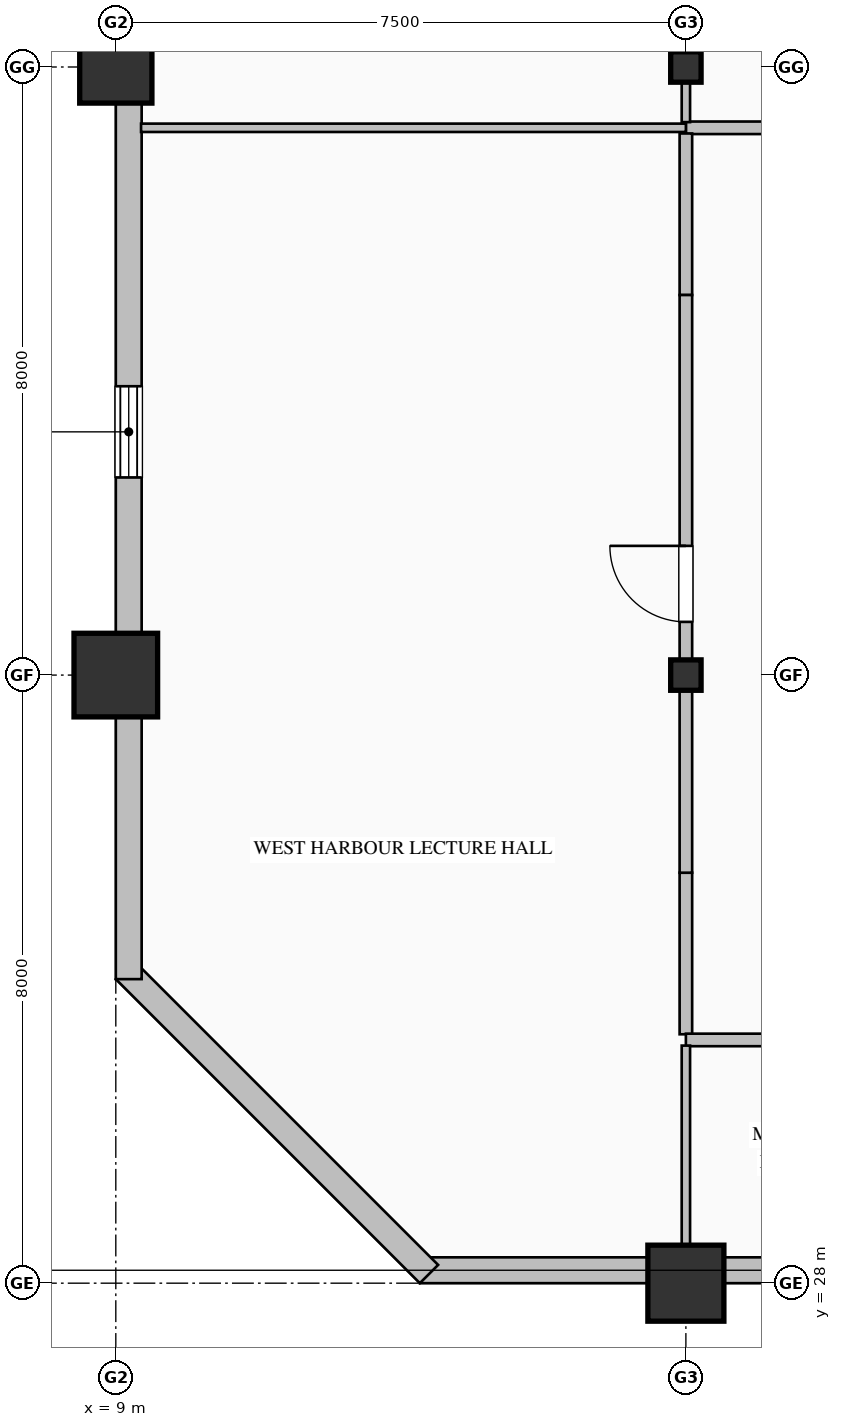
"""IFC4 building model, lengths in metres.
Left out: names, types, materials, properties, quantities, classifications, styles, units other than length and angle.
Written with IfcOpenShell. Run it as: python <this file> out.ifc"""

import sys

from ifc_helpers import new_model, si_unit, direction, frame, frame_2d, origin, origin_2d, place, context, subcontext, project, spatial, rectangle, hollow_rectangle, hollow_circle, i_section, extrude, element, fill, save


model = new_model("IFC4")
c1 = context("Model", 3, precision=1e-05, world=origin(), true_north=direction((0.0, 1.0)))
c2 = subcontext(c1, "Body", "Model", "MODEL_VIEW")
j1 = project(units=[si_unit("LENGTHUNIT", "METRE"), si_unit("PLANEANGLEUNIT", "RADIAN")], contexts=[c1])
p1 = place(None, origin())
s1 = spatial("IfcSite", under=j1, at=p1, CompositionType="ELEMENT")
p2 = place(p1, origin())
s2 = spatial("IfcBuilding", under=s1, at=p2, CompositionType="ELEMENT")
p3 = place(p2, frame((0.0, 0.0, 131.0)))
s3 = spatial("IfcBuildingStorey", under=s2, at=p3, CompositionType="ELEMENT", Elevation=131.0)
p4 = place(p3, frame((9.0, 36.0, 0.0), z_axis=(0.0, 0.0, 1.0), x_axis=(1.0, 0.0, 0.0)))
e1 = element("IfcColumn", 1, at=p4, inside=s3, PredefinedType="COLUMN", context=c2, shape_type="SweptSolid", body=[
    extrude(hollow_rectangle(XDim=1.1, YDim=1.1, WallThickness=0.04, at=origin_2d()), origin(), (0.0, 0.0, 1.0), 4.0),
])
p5 = place(p3, frame((9.0, 44.0, 0.0), z_axis=(0.0, 0.0, 1.0), x_axis=(1.0, 0.0, 0.0)))
e2 = element("IfcColumn", 2, at=p5, inside=s3, PredefinedType="COLUMN", context=c2, shape_type="SweptSolid", body=[
    extrude(hollow_rectangle(XDim=0.95, YDim=0.95, WallThickness=0.036, at=origin_2d()), origin(), (0.0, 0.0, 1.0), 4.0),
])
p6 = place(p3, frame((16.5, 28.0, 0.0), z_axis=(0.0, 0.0, 1.0), x_axis=(1.0, 0.0, 0.0)))
e3 = element("IfcColumn", 3, at=p6, inside=s3, PredefinedType="COLUMN", context=c2, shape_type="SweptSolid", body=[
    extrude(hollow_circle(Radius=0.5, WallThickness=0.036, at=origin_2d()), origin(), (0.0, 0.0, 1.0), 4.0),
])
for number, where, z_axis, x_axis in (
    (4, (16.5, 36.0, 0.0), (0.0, 0.0, 1.0), (1.0, 0.0, 0.0)),
    (5, (16.5, 44.0, 0.0), (0.0, 0.0, 1.0), (1.0, 0.0, 0.0)),
):
    element("IfcColumn", number, at=place(p3, frame(where, z_axis=z_axis, x_axis=x_axis)), inside=s3, PredefinedType="COLUMN", context=c2, shape_type="SweptSolid", body=[
        extrude(i_section(OverallWidth=0.4, OverallDepth=0.4, WebThickness=0.013, FlangeThickness=0.021, FilletRadius=0.022, at=origin_2d()), origin(), (0.0, 0.0, 1.0), 4.0),
    ])
p7 = place(p3, frame((40.52, 28.17, 0.0), z_axis=(0.0, 0.0, 1.0), x_axis=(-1.0, 0.0, 0.0)))
e6 = element("IfcWall", 6, at=p7, inside=s3, PredefinedType="SOLIDWALL", context=c2, shape_type="SweptSolid", body=[
    extrude(rectangle(XDim=27.52, YDim=0.34, at=frame_2d((13.76, 0.0))), origin(), (0.0, 0.0, 1.0), 3.165),
])
p8 = place(p7, frame((9.975, 0.0, 0.85)))
e7 = element("IfcOpeningElement", 7, at=p8, cuts=e6, PredefinedType="OPENING", context=c2, shape_type="SweptSolid", body=[
    extrude(rectangle(XDim=1.65, YDim=1.95, at=frame_2d((0.825, 0.975))), frame((0.0, 0.18, 0.0), z_axis=(0.0, -1.0, 0.0), x_axis=(1.0, 0.0, 0.0)), (0.0, 0.0, 1.0), 0.36),
])
p9 = place(p7, frame((17.25, 0.0, 0.85)))
e8 = element("IfcOpeningElement", 8, at=p9, cuts=e6, PredefinedType="OPENING", context=c2, shape_type="SweptSolid", body=[
    extrude(rectangle(XDim=1.5, YDim=1.95, at=frame_2d((0.75, 0.975))), frame((0.0, 0.18, 0.0), z_axis=(0.0, -1.0, 0.0), x_axis=(1.0, 0.0, 0.0)), (0.0, 0.0, 1.0), 0.36),
])
p10 = place(p7, frame((20.775, 0.0, 0.85)))
e9 = element("IfcOpeningElement", 9, at=p10, cuts=e6, PredefinedType="OPENING", context=c2, shape_type="SweptSolid", body=[
    extrude(rectangle(XDim=1.65, YDim=1.95, at=frame_2d((0.825, 0.975))), frame((0.0, 0.18, 0.0), z_axis=(0.0, -1.0, 0.0), x_axis=(1.0, 0.0, 0.0)), (0.0, 0.0, 1.0), 0.36),
])
p11 = place(p3, frame((13.12, 28.12, 0.0), z_axis=(0.0, 0.0, 1.0), x_axis=(-0.707106781187, 0.707106781187, 0.0)))
e10 = element("IfcWall", 10, at=p11, inside=s3, PredefinedType="SOLIDWALL", context=c2, shape_type="SweptSolid", body=[
    extrude(rectangle(XDim=5.657, YDim=0.34, at=frame_2d((2.828, 0.0))), origin(), (0.0, 0.0, 1.0), 3.765),
])
p12 = place(p3, frame((9.17, 32.0, 0.0), z_axis=(0.0, 0.0, 1.0), x_axis=(0.0, 1.0, 0.0)))
e11 = element("IfcWall", 11, at=p12, inside=s3, PredefinedType="SOLIDWALL", context=c2, shape_type="SweptSolid", body=[
    extrude(rectangle(XDim=16.0, YDim=0.34, at=frame_2d((8.0, 0.0))), origin(), (0.0, 0.0, 1.0), 3.265),
])
p13 = place(p12, frame((6.6, 0.0, 0.7)))
e12 = element("IfcOpeningElement", 12, at=p13, cuts=e11, PredefinedType="OPENING", context=c2, shape_type="SweptSolid", body=[
    extrude(rectangle(XDim=1.2, YDim=1.85, at=frame_2d((0.6, 0.925))), frame((0.0, 0.18, 0.0), z_axis=(0.0, -1.0, 0.0), x_axis=(1.0, 0.0, 0.0)), (0.0, 0.0, 1.0), 0.36),
])
p14 = place(p3, frame((16.5, 31.274, 0.0), z_axis=(0.0, 0.0, 1.0), x_axis=(0.0, 1.0, 0.0)))
e13 = element("IfcWall", 13, at=p14, inside=s3, PredefinedType="PARTITIONING", context=c2, shape_type="SweptSolid", body=[
    extrude(rectangle(XDim=2.125, YDim=0.165, at=frame_2d((1.063, 0.0))), origin(), (0.0, 0.0, 1.0), 3.157),
])
p15 = place(p3, frame((27.0, 31.2, 0.0), z_axis=(0.0, 0.0, 1.0), x_axis=(-1.0, 0.0, 0.0)))
e14 = element("IfcWall", 14, at=p15, inside=s3, PredefinedType="PARTITIONING", context=c2, shape_type="SweptSolid", body=[
    extrude(rectangle(XDim=10.5, YDim=0.165, at=frame_2d((5.25, 0.0))), origin(), (0.0, 0.0, 1.0), 3.765),
])
p16 = place(p15, frame((4.7, 0.0, 0.0)))
e15 = element("IfcOpeningElement", 15, at=p16, cuts=e14, PredefinedType="OPENING", context=c2, shape_type="SweptSolid", body=[
    extrude(rectangle(XDim=1.1, YDim=2.2, at=frame_2d((0.55, 1.1))), frame((0.0, 0.093, 0.0), z_axis=(0.0, -1.0, 0.0), x_axis=(1.0, 0.0, 0.0)), (0.0, 0.0, 1.0), 0.185),
])
p17 = place(p3, frame((16.5, 43.2, 0.0), z_axis=(0.0, 0.0, 1.0), x_axis=(1.0, 0.0, 0.0)))
e16 = element("IfcWall", 16, at=p17, inside=s3, PredefinedType="PARTITIONING", context=c2, shape_type="SweptSolid", body=[
    extrude(rectangle(XDim=8.0, YDim=0.165, at=frame_2d((4.0, 0.0))), origin(), (0.0, 0.0, 1.0), 3.765),
])
p18 = place(p17, frame((3.45, 0.0, 0.0)))
e17 = element("IfcOpeningElement", 17, at=p18, cuts=e16, PredefinedType="OPENING", context=c2, shape_type="SweptSolid", body=[
    extrude(rectangle(XDim=1.1, YDim=2.2, at=frame_2d((0.55, 1.1))), frame((0.0, 0.093, 0.0), z_axis=(0.0, -1.0, 0.0), x_axis=(1.0, 0.0, 0.0)), (0.0, 0.0, 1.0), 0.185),
])
p19 = place(p3, frame((16.5, 41.0, 0.0), z_axis=(0.0, 0.0, 1.0), x_axis=(0.0, 1.0, 0.0)))
e18 = element("IfcWall", 18, at=p19, inside=s3, PredefinedType="PARTITIONING", context=c2, shape_type="SweptSolid", body=[
    extrude(rectangle(XDim=2.125, YDim=0.165, at=frame_2d((1.063, 0.0))), origin(), (0.0, 0.0, 1.0), 3.157),
])
p20 = place(p3, frame((16.5, 33.4, 0.0), z_axis=(0.0, 0.0, 1.0), x_axis=(0.0, 1.0, 0.0)))
e19 = element("IfcWall", 19, at=p20, inside=s3, PredefinedType="PARTITIONING", context=c2, shape_type="SweptSolid", body=[
    extrude(rectangle(XDim=7.6, YDim=0.165, at=frame_2d((3.8, 0.0))), origin(), (0.0, 0.0, 1.0), 3.157),
])
p21 = place(p20, frame((3.3, 0.0, 0.0)))
e20 = element("IfcOpeningElement", 20, at=p21, cuts=e19, PredefinedType="OPENING", context=c2, shape_type="SweptSolid", body=[
    extrude(rectangle(XDim=1.0, YDim=2.15, at=frame_2d((0.5, 1.075))), frame((0.0, 0.093, 0.0), z_axis=(0.0, -1.0, 0.0), x_axis=(1.0, 0.0, 0.0)), (0.0, 0.0, 1.0), 0.185),
])
p22 = place(p3, frame((16.5, 51.668, 0.0), z_axis=(0.0, 0.0, 1.0), x_axis=(0.0, -1.0, 0.0)))
e21 = element("IfcWall", 21, at=p22, inside=s3, PredefinedType="MOVABLE", context=c2, shape_type="SweptSolid", body=[
    extrude(rectangle(XDim=8.394, YDim=0.11, at=frame_2d((4.197, 0.0))), origin(), (0.0, 0.0, 1.0), 3.157),
])
p23 = place(p22, frame((3.647, 0.0, 0.0)))
e22 = element("IfcOpeningElement", 22, at=p23, cuts=e21, PredefinedType="OPENING", context=c2, shape_type="SweptSolid", body=[
    extrude(rectangle(XDim=1.1, YDim=2.2, at=frame_2d((0.55, 1.1))), frame((0.0, 0.065, 0.0), z_axis=(0.0, -1.0, 0.0), x_axis=(1.0, 0.0, 0.0)), (0.0, 0.0, 1.0), 0.13),
])
p24 = place(p3, frame((16.5, 43.2, 0.0), z_axis=(0.0, 0.0, 1.0), x_axis=(-1.0, 0.0, 0.0)))
e23 = element("IfcWall", 23, at=p24, inside=s3, PredefinedType="MOVABLE", context=c2, shape_type="SweptSolid", body=[
    extrude(rectangle(XDim=7.168, YDim=0.11, at=frame_2d((3.584, 0.0))), origin(), (0.0, 0.0, 1.0), 3.765),
])
p25 = place(p3, frame((16.5, 31.125, 0.0), z_axis=(0.0, 0.0, 1.0), x_axis=(0.0, -1.0, 0.0)))
e24 = element("IfcWall", 24, at=p25, inside=s3, PredefinedType="MOVABLE", context=c2, shape_type="SweptSolid", body=[
    extrude(rectangle(XDim=2.793, YDim=0.11, at=frame_2d((1.397, 0.0))), origin(), (0.0, 0.0, 1.0), 3.157),
])
p26 = place(p13, origin())
e25 = element("IfcWindow", 25, at=p26, inside=s3, PartitioningType="DOUBLE_PANEL_VERTICAL", PredefinedType="WINDOW", context=c2, shape_type="SweptSolid", body=[
    extrude(rectangle(XDim=1.2, YDim=1.85, at=frame_2d((0.6, 0.925))), frame((0.0, 0.15, 0.0), z_axis=(0.0, -1.0, 0.0), x_axis=(1.0, 0.0, 0.0)), (0.0, 0.0, 1.0), 0.06),
])
fill(e12, e25)
p27 = place(p21, origin())
e26 = element("IfcDoor", 26, at=p27, inside=s3, OperationType="SINGLE_SWING_RIGHT", PredefinedType="DOOR", context=c2, shape_type="SweptSolid", body=[
    extrude(rectangle(XDim=1.0, YDim=2.15, at=frame_2d((0.5, 1.075))), frame((0.0, 0.025, 0.0), z_axis=(0.0, -1.0, 0.0), x_axis=(1.0, 0.0, 0.0)), (0.0, 0.0, 1.0), 0.05),
])
fill(e20, e26)
save(model, sys.argv[1])
